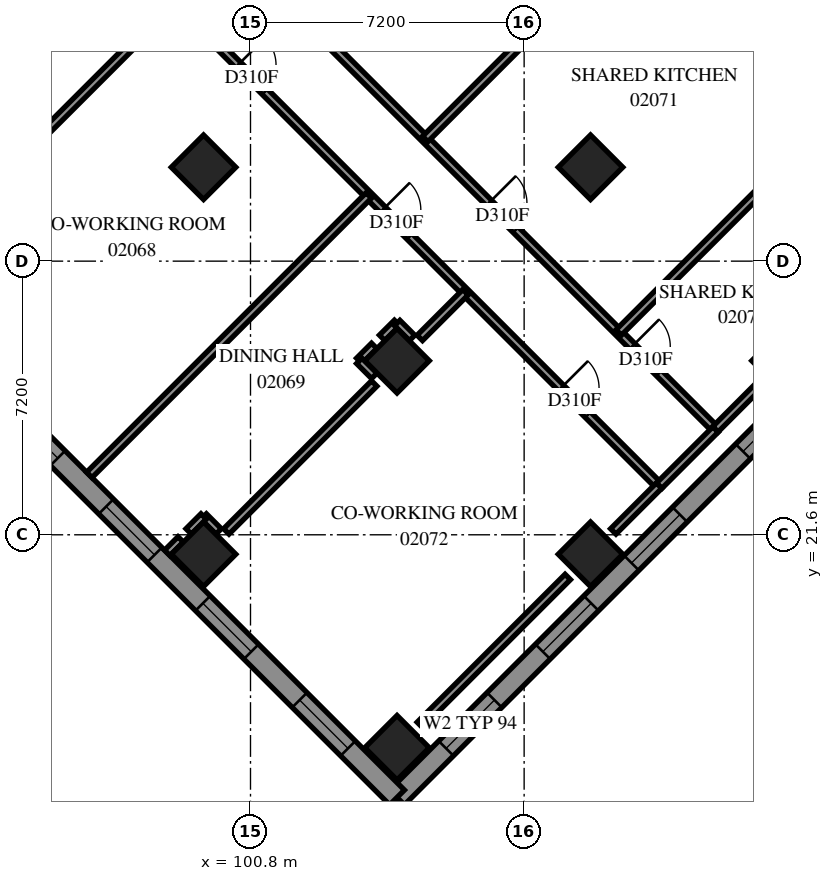
"""IFC4 building model, lengths in metres.
Left out: names, types, materials, properties, quantities, classifications, styles, units other than length and angle.
Written with IfcOpenShell. Run it as: python <this file> out.ifc"""

import sys

from ifc_helpers import new_model, si_unit, direction, frame, frame_2d, origin, origin_2d, place, context, subcontext, project, spatial, polyline, rectangle, outline, extrude, element, fill, save


model = new_model("IFC4")
c1 = context("Model", 3, precision=1e-05, world=origin(), true_north=direction((0.0, 1.0)))
c2 = subcontext(c1, "Body", "Model", "MODEL_VIEW")
j1 = project(units=[si_unit("LENGTHUNIT", "METRE"), si_unit("PLANEANGLEUNIT", "RADIAN")], contexts=[c1])
p1 = place(None, origin())
s1 = spatial("IfcSite", under=j1, at=p1, CompositionType="ELEMENT")
p2 = place(p1, origin())
s2 = spatial("IfcBuilding", under=s1, at=p2, CompositionType="ELEMENT")
p3 = place(p2, frame((0.0, 0.0, 10.2)))
s3 = spatial("IfcBuildingStorey", under=s2, at=p3, CompositionType="ELEMENT", Elevation=10.2)
for number, where, z_axis, x_axis in (
    (1, (99.565, 31.271, 0.0), (0.0, 0.0, 1.0), (0.707, -0.707, 0.0)),
    (2, (109.747, 31.271, 0.0), (0.0, 0.0, 1.0), (0.707, -0.707, 0.0)),
    (3, (104.656, 26.18, 0.0), (0.0, 0.0, 1.0), (0.707, -0.707, 0.0)),
    (4, (99.565, 21.088, 0.0), (0.0, 0.0, 1.0), (0.707, -0.707, 0.0)),
    (5, (114.838, 26.18, 0.0), (0.0, 0.0, 1.0), (0.707, -0.707, 0.0)),
    (6, (109.747, 21.088, 0.0), (0.0, 0.0, 1.0), (0.707, -0.707, 0.0)),
    (7, (104.656, 15.997, 0.0), (0.0, 0.0, 1.0), (0.707, -0.707, 0.0)),
):
    element("IfcColumn", number, at=place(p3, frame(where, z_axis=z_axis, x_axis=x_axis)), inside=s3, PredefinedType="COLUMN", context=c2, shape_type="SweptSolid", body=[
        extrude(rectangle(XDim=1.2, YDim=1.2, at=origin_2d()), origin(), (0.0, 0.0, 1.0), 3.8),
    ])
p4 = place(p3, frame((104.656, 14.689, 0.0), z_axis=(0.0, 0.0, 1.0), x_axis=(0.7071094621, 0.7071041002, 0.0)))
e8 = element("IfcWall", 8, at=p4, inside=s3, PredefinedType="SOLIDWALL", context=c2, shape_type="SweptSolid", body=[
    extrude(outline(polyline([(-0.275, -0.275), (18.925, -0.275), (18.375, 0.275), (0.275, 0.275), (-0.275, -0.275)])), origin(), (0.0, 0.0, 1.0), 3.8),
])
p5 = place(p4, frame((1.825, 0.0, 0.7)))
e9 = element("IfcOpeningElement", 9, at=p5, cuts=e8, PredefinedType="OPENING", context=c2, shape_type="SweptSolid", body=[
    extrude(rectangle(XDim=1.8, YDim=2.6, at=frame_2d((0.9, 1.3))), frame((0.0, 0.285, 0.0), z_axis=(0.0, -1.0, 0.0), x_axis=(1.0, 0.0, 0.0)), (0.0, 0.0, 1.0), 0.57),
])
p6 = place(p4, frame((5.425, 0.0, 0.7)))
e10 = element("IfcOpeningElement", 10, at=p6, cuts=e8, PredefinedType="OPENING", context=c2, shape_type="SweptSolid", body=[
    extrude(rectangle(XDim=1.8, YDim=2.6, at=frame_2d((0.9, 1.3))), frame((0.0, 0.285, 0.0), z_axis=(0.0, -1.0, 0.0), x_axis=(1.0, 0.0, 0.0)), (0.0, 0.0, 1.0), 0.57),
])
p7 = place(p4, frame((8.725, 0.0, 0.7)))
e11 = element("IfcOpeningElement", 11, at=p7, cuts=e8, PredefinedType="OPENING", context=c2, shape_type="SweptSolid", body=[
    extrude(rectangle(XDim=1.8, YDim=2.6, at=frame_2d((0.9, 1.3))), frame((0.0, 0.285, 0.0), z_axis=(0.0, -1.0, 0.0), x_axis=(1.0, 0.0, 0.0)), (0.0, 0.0, 1.0), 0.57),
])
p8 = place(p4, frame((12.875, 0.0, 0.7)))
e12 = element("IfcOpeningElement", 12, at=p8, cuts=e8, PredefinedType="OPENING", context=c2, shape_type="SweptSolid", body=[
    extrude(rectangle(XDim=1.8, YDim=2.6, at=frame_2d((0.9, 1.3))), frame((0.0, 0.285, 0.0), z_axis=(0.0, -1.0, 0.0), x_axis=(1.0, 0.0, 0.0)), (0.0, 0.0, 1.0), 0.57),
])
p9 = place(p4, frame((16.05, 0.0, 0.7)))
e13 = element("IfcOpeningElement", 13, at=p9, cuts=e8, PredefinedType="OPENING", context=c2, shape_type="SweptSolid", body=[
    extrude(rectangle(XDim=1.8, YDim=2.6, at=frame_2d((0.9, 1.3))), frame((0.0, 0.285, 0.0), z_axis=(0.0, -1.0, 0.0), x_axis=(1.0, 0.0, 0.0)), (0.0, 0.0, 1.0), 0.57),
])
p10 = place(p3, frame((77.07, 42.275, 0.0), z_axis=(0.0, 0.0, 1.0), x_axis=(0.7071067812, -0.7071067812, 0.0)))
e14 = element("IfcWall", 14, at=p10, inside=s3, PredefinedType="SOLIDWALL", context=c2, shape_type="SweptSolid", body=[
    extrude(outline(polyline([(0.114, -0.275), (39.288, -0.275), (38.737, 0.275), (-0.114, 0.275), (0.114, -0.275)])), origin(), (0.0, 0.0, 1.0), 3.8),
])
p11 = place(p10, frame((2.837, 0.0, 0.7)))
e15 = element("IfcOpeningElement", 15, at=p11, cuts=e14, PredefinedType="OPENING", context=c2, shape_type="SweptSolid", body=[
    extrude(rectangle(XDim=1.8, YDim=2.6, at=frame_2d((0.9, 1.3))), frame((0.0, 0.285, 0.0), z_axis=(0.0, -1.0, 0.0), x_axis=(1.0, 0.0, 0.0)), (0.0, 0.0, 1.0), 0.57),
])
p12 = place(p10, frame((6.588, 0.0, 0.7)))
e16 = element("IfcOpeningElement", 16, at=p12, cuts=e14, PredefinedType="OPENING", context=c2, shape_type="SweptSolid", body=[
    extrude(rectangle(XDim=1.8, YDim=2.6, at=frame_2d((0.9, 1.3))), frame((0.0, 0.285, 0.0), z_axis=(0.0, -1.0, 0.0), x_axis=(1.0, 0.0, 0.0)), (0.0, 0.0, 1.0), 0.57),
])
p13 = place(p10, frame((10.188, 0.0, 0.7)))
e17 = element("IfcOpeningElement", 17, at=p13, cuts=e14, PredefinedType="OPENING", context=c2, shape_type="SweptSolid", body=[
    extrude(rectangle(XDim=1.8, YDim=2.6, at=frame_2d((0.9, 1.3))), frame((0.0, 0.285, 0.0), z_axis=(0.0, -1.0, 0.0), x_axis=(1.0, 0.0, 0.0)), (0.0, 0.0, 1.0), 0.57),
])
p14 = place(p10, frame((13.787, 0.0, 0.7)))
e18 = element("IfcOpeningElement", 18, at=p14, cuts=e14, PredefinedType="OPENING", context=c2, shape_type="SweptSolid", body=[
    extrude(rectangle(XDim=1.8, YDim=2.6, at=frame_2d((0.9, 1.3))), frame((0.0, 0.285, 0.0), z_axis=(0.0, -1.0, 0.0), x_axis=(1.0, 0.0, 0.0)), (0.0, 0.0, 1.0), 0.57),
])
p15 = place(p10, frame((17.387, 0.0, 0.7)))
e19 = element("IfcOpeningElement", 19, at=p15, cuts=e14, PredefinedType="OPENING", context=c2, shape_type="SweptSolid", body=[
    extrude(rectangle(XDim=1.8, YDim=2.6, at=frame_2d((0.9, 1.3))), frame((0.0, 0.285, 0.0), z_axis=(0.0, -1.0, 0.0), x_axis=(1.0, 0.0, 0.0)), (0.0, 0.0, 1.0), 0.57),
])
p16 = place(p10, frame((20.988, 0.0, 0.7)))
e20 = element("IfcOpeningElement", 20, at=p16, cuts=e14, PredefinedType="OPENING", context=c2, shape_type="SweptSolid", body=[
    extrude(rectangle(XDim=1.8, YDim=2.6, at=frame_2d((0.9, 1.3))), frame((0.0, 0.285, 0.0), z_axis=(0.0, -1.0, 0.0), x_axis=(1.0, 0.0, 0.0)), (0.0, 0.0, 1.0), 0.57),
])
p17 = place(p10, frame((24.587, 0.0, 0.7)))
e21 = element("IfcOpeningElement", 21, at=p17, cuts=e14, PredefinedType="OPENING", context=c2, shape_type="SweptSolid", body=[
    extrude(rectangle(XDim=1.8, YDim=2.6, at=frame_2d((0.9, 1.3))), frame((0.0, 0.285, 0.0), z_axis=(0.0, -1.0, 0.0), x_axis=(1.0, 0.0, 0.0)), (0.0, 0.0, 1.0), 0.57),
])
p18 = place(p10, frame((28.188, 0.0, 0.7)))
e22 = element("IfcOpeningElement", 22, at=p18, cuts=e14, PredefinedType="OPENING", context=c2, shape_type="SweptSolid", body=[
    extrude(rectangle(XDim=1.8, YDim=2.6, at=frame_2d((0.9, 1.3))), frame((0.0, 0.285, 0.0), z_axis=(0.0, -1.0, 0.0), x_axis=(1.0, 0.0, 0.0)), (0.0, 0.0, 1.0), 0.57),
])
p19 = place(p10, frame((31.788, 0.0, 0.7)))
e23 = element("IfcOpeningElement", 23, at=p19, cuts=e14, PredefinedType="OPENING", context=c2, shape_type="SweptSolid", body=[
    extrude(rectangle(XDim=1.8, YDim=2.6, at=frame_2d((0.9, 1.3))), frame((0.0, 0.285, 0.0), z_axis=(0.0, -1.0, 0.0), x_axis=(1.0, 0.0, 0.0)), (0.0, 0.0, 1.0), 0.57),
])
p20 = place(p10, frame((35.388, 0.0, 0.7)))
e24 = element("IfcOpeningElement", 24, at=p20, cuts=e14, PredefinedType="OPENING", context=c2, shape_type="SweptSolid", body=[
    extrude(rectangle(XDim=1.8, YDim=2.6, at=frame_2d((0.9, 1.3))), frame((0.0, 0.285, 0.0), z_axis=(0.0, -1.0, 0.0), x_axis=(1.0, 0.0, 0.0)), (0.0, 0.0, 1.0), 0.57),
])
p21 = place(p3, frame((94.861, 42.544, 0.0), z_axis=(0.0, 0.0, 1.0), x_axis=(0.7071067812, -0.7071067812, 0.0)))
e25 = element("IfcWall", 25, at=p21, inside=s3, PredefinedType="PARTITIONING", context=c2, shape_type="SweptSolid", body=[
    extrude(rectangle(XDim=25.699, YDim=0.2, at=frame_2d((12.85, 0.0))), origin(), (0.0, 0.0, 1.0), 3.8),
])
p22 = place(p21, frame((10.072, 0.0, 0.0)))
e26 = element("IfcOpeningElement", 26, at=p22, cuts=e25, PredefinedType="OPENING", context=c2, shape_type="SweptSolid", body=[
    extrude(rectangle(XDim=1.0, YDim=2.1, at=frame_2d((0.5, 1.05))), frame((0.0, 0.11, 0.0), z_axis=(0.0, -1.0, 0.0), x_axis=(1.0, 0.0, 0.0)), (0.0, 0.0, 1.0), 0.22),
])
p23 = place(p21, frame((2.872, 0.0, 0.0)))
e27 = element("IfcOpeningElement", 27, at=p23, cuts=e25, PredefinedType="OPENING", context=c2, shape_type="SweptSolid", body=[
    extrude(rectangle(XDim=1.0, YDim=2.1, at=frame_2d((0.5, 1.05))), frame((0.0, 0.11, 0.0), z_axis=(0.0, -1.0, 0.0), x_axis=(1.0, 0.0, 0.0)), (0.0, 0.0, 1.0), 0.22),
])
p24 = place(p21, frame((17.272, 0.0, 0.0)))
e28 = element("IfcOpeningElement", 28, at=p24, cuts=e25, PredefinedType="OPENING", context=c2, shape_type="SweptSolid", body=[
    extrude(rectangle(XDim=1.0, YDim=2.1, at=frame_2d((0.5, 1.05))), frame((0.0, 0.11, 0.0), z_axis=(0.0, -1.0, 0.0), x_axis=(1.0, 0.0, 0.0)), (0.0, 0.0, 1.0), 0.22),
])
p25 = place(p21, frame((22.606, 0.0, 0.0)))
e29 = element("IfcOpeningElement", 29, at=p25, cuts=e25, PredefinedType="OPENING", context=c2, shape_type="SweptSolid", body=[
    extrude(rectangle(XDim=1.0, YDim=2.1, at=frame_2d((0.5, 1.05))), frame((0.0, 0.11, 0.0), z_axis=(0.0, -1.0, 0.0), x_axis=(1.0, 0.0, 0.0)), (0.0, 0.0, 1.0), 0.22),
])
p26 = place(p3, frame((93.375, 41.061, 0.0), z_axis=(0.0, 0.0, 1.0), x_axis=(0.7071067812, -0.7071067812, 0.0)))
e30 = element("IfcWall", 30, at=p26, inside=s3, PredefinedType="PARTITIONING", context=c2, shape_type="SweptSolid", body=[
    extrude(rectangle(XDim=25.699, YDim=0.2, at=frame_2d((12.85, 0.0))), origin(), (0.0, 0.0, 1.0), 3.8),
])
p27 = place(p26, frame((2.837, 0.0, 0.0)))
e31 = element("IfcOpeningElement", 31, at=p27, cuts=e30, PredefinedType="OPENING", context=c2, shape_type="SweptSolid", body=[
    extrude(rectangle(XDim=1.0, YDim=2.1, at=frame_2d((0.5, 1.05))), frame((0.0, 0.11, 0.0), z_axis=(0.0, -1.0, 0.0), x_axis=(1.0, 0.0, 0.0)), (0.0, 0.0, 1.0), 0.22),
])
p28 = place(p26, frame((10.037, 0.0, 0.0)))
e32 = element("IfcOpeningElement", 32, at=p28, cuts=e30, PredefinedType="OPENING", context=c2, shape_type="SweptSolid", body=[
    extrude(rectangle(XDim=1.0, YDim=2.1, at=frame_2d((0.5, 1.05))), frame((0.0, 0.11, 0.0), z_axis=(0.0, -1.0, 0.0), x_axis=(1.0, 0.0, 0.0)), (0.0, 0.0, 1.0), 0.22),
])
p29 = place(p26, frame((15.425, 0.0, 0.0)))
e33 = element("IfcOpeningElement", 33, at=p29, cuts=e30, PredefinedType="OPENING", context=c2, shape_type="SweptSolid", body=[
    extrude(rectangle(XDim=1.0, YDim=2.1, at=frame_2d((0.5, 1.05))), frame((0.0, 0.11, 0.0), z_axis=(0.0, -1.0, 0.0), x_axis=(1.0, 0.0, 0.0)), (0.0, 0.0, 1.0), 0.22),
])
p30 = place(p26, frame((22.057, 0.0, 0.0)))
e34 = element("IfcOpeningElement", 34, at=p30, cuts=e30, PredefinedType="OPENING", context=c2, shape_type="SweptSolid", body=[
    extrude(rectangle(XDim=1.0, YDim=2.1, at=frame_2d((0.5, 1.05))), frame((0.0, 0.11, 0.0), z_axis=(0.0, -1.0, 0.0), x_axis=(1.0, 0.0, 0.0)), (0.0, 0.0, 1.0), 0.22),
])
for number, where, z_axis, x_axis in (
    (35, (91.468, 28.266, 0.0), (0.0, 0.0, 1.0), (0.707, 0.707, 0.0)),
    (36, (96.559, 23.175, 0.0), (0.0, 0.0, 1.0), (0.707, 0.707, 0.0)),
):
    element("IfcWall", number, at=place(p3, frame(where, z_axis=z_axis, x_axis=x_axis)), inside=s3, PredefinedType="PARTITIONING", context=c2, shape_type="SweptSolid", body=[
        extrude(rectangle(XDim=10.4, YDim=0.2, at=frame_2d((5.2, 0.0))), origin(), (0.0, 0.0, 1.0), 3.8),
    ])
p31 = place(p3, frame((105.398, 32.014, 0.0), z_axis=(0.0, 0.0, 1.0), x_axis=(0.7071019733, 0.707111589, 0.0)))
e37 = element("IfcWall", 37, at=p31, inside=s3, PredefinedType="PARTITIONING", context=c2, shape_type="SweptSolid", body=[
    extrude(rectangle(XDim=10.4, YDim=0.2, at=frame_2d((5.2, 0.0))), origin(), (0.0, 0.0, 1.0), 3.8),
])
p32 = place(p3, frame((110.489, 26.923, 0.0), z_axis=(0.0, 0.0, 1.0), x_axis=(0.7071067812, 0.7071067812, 0.0)))
e38 = element("IfcWall", 38, at=p32, inside=s3, PredefinedType="PARTITIONING", context=c2, shape_type="SweptSolid", body=[
    extrude(rectangle(XDim=5.6, YDim=0.2, at=frame_2d((2.8, 0.0))), origin(), (0.0, 0.0, 1.0), 3.8),
])
p33 = place(p3, frame((105.255, 16.599, 0.0), z_axis=(0.0, 0.0, 1.0), x_axis=(0.7071067812, 0.7071067812, 0.0)))
e39 = element("IfcWall", 39, at=p33, inside=s3, PredefinedType="PARTITIONING", context=c2, shape_type="SweptSolid", body=[
    extrude(rectangle(XDim=5.504, YDim=0.2, at=frame_2d((2.752, 0.0))), origin(), (0.0, 0.0, 1.0), 3.2),
])
p34 = place(p3, frame((100.163, 21.689, 0.0), z_axis=(0.0, 0.0, 1.0), x_axis=(0.7071067812, 0.7071067812, 0.0)))
e40 = element("IfcWall", 40, at=p34, inside=s3, PredefinedType="PARTITIONING", context=c2, shape_type="SweptSolid", body=[
    extrude(rectangle(XDim=5.504, YDim=0.2, at=frame_2d((2.752, 0.0))), origin(), (0.0, 0.0, 1.0), 3.8),
])
p35 = place(p3, frame((111.552, 22.89, 0.0), z_axis=(0.0, 0.0, 1.0), x_axis=(0.7075827869, 0.7066304548, 0.0)))
e41 = element("IfcWall", 41, at=p35, inside=s3, PredefinedType="PARTITIONING", context=c2, shape_type="SweptSolid", body=[
    extrude(rectangle(XDim=2.1, YDim=0.2, at=frame_2d((1.05, 0.0))), origin(), (0.0, 0.0, 1.0), 3.2),
])
p36 = place(p3, frame((110.346, 21.689, 0.0), z_axis=(0.0, 0.0, 1.0), x_axis=(0.7071067812, 0.7071067812, 0.0)))
e42 = element("IfcWall", 42, at=p36, inside=s3, PredefinedType="PARTITIONING", context=c2, shape_type="SweptSolid", body=[
    extrude(rectangle(XDim=1.703, YDim=0.2, at=frame_2d((0.851, 0.0))), origin(), (0.0, 0.0, 1.0), 3.2),
])
p37 = place(p3, frame((113.034, 24.378, 0.0), z_axis=(0.0, 0.0, 1.0), x_axis=(0.7065187509, 0.7076943229, 0.0)))
e43 = element("IfcWall", 43, at=p37, inside=s3, PredefinedType="PARTITIONING", context=c2, shape_type="SweptSolid", body=[
    extrude(rectangle(XDim=1.701, YDim=0.2, at=frame_2d((0.851, 0.0))), origin(), (0.0, 0.0, 1.0), 3.2),
])
p38 = place(p3, frame((105.255, 26.781, 0.0), z_axis=(0.0, 0.0, 1.0), x_axis=(0.7071067812, 0.7071067812, 0.0)))
e44 = element("IfcWall", 44, at=p38, inside=s3, PredefinedType="PARTITIONING", context=c2, shape_type="SweptSolid", body=[
    extrude(rectangle(XDim=1.7, YDim=0.2, at=frame_2d((0.85, 0.0))), origin(), (0.0, 0.0, 1.0), 3.8),
])
for number, where, z_axis, x_axis in (
    (45, (99.568, 22.082, 0.0), (0.0, 0.0, 1.0), (0.707, -0.707, 0.0)),
    (46, (99.173, 21.689, 0.0), (0.0, 0.0, 1.0), (0.707, 0.707, 0.0)),
    (47, (103.661, 26.177, 0.0), (0.0, 0.0, 1.0), (0.707, 0.707, 0.0)),
    (48, (103.662, 26.177, 0.0), (0.0, 0.0, 1.0), (0.707, -0.707, 0.0)),
):
    element("IfcWall", number, at=place(p3, frame(where, z_axis=z_axis, x_axis=x_axis)), inside=s3, PredefinedType="PARTITIONING", context=c2, shape_type="SweptSolid", body=[
        extrude(rectangle(XDim=0.557, YDim=0.2, at=frame_2d((0.279, 0.0))), origin(), (0.0, 0.0, 1.0), 3.8),
    ])
p39 = place(p3, frame((104.263, 26.784, 0.0), z_axis=(0.0, 0.0, 1.0), x_axis=(0.7089037401, 0.705305244, 0.0)))
e49 = element("IfcWall", 49, at=p39, inside=s3, PredefinedType="PARTITIONING", context=c2, shape_type="SweptSolid", body=[
    extrude(rectangle(XDim=0.556, YDim=0.2, at=frame_2d((0.278, 0.0))), origin(), (0.0, 0.0, 1.0), 3.8),
])
p40 = place(p3, frame((104.66, 27.172, 0.0), z_axis=(0.0, 0.0, 1.0), x_axis=(0.7071067812, -0.7071067812, 0.0)))
e50 = element("IfcWall", 50, at=p40, inside=s3, PredefinedType="PARTITIONING", context=c2, shape_type="SweptSolid", body=[
    extrude(rectangle(XDim=0.554, YDim=0.2, at=frame_2d((0.277, 0.0))), origin(), (0.0, 0.0, 1.0), 3.8),
])
p41 = place(p3, frame((98.609, 21.125, 0.0), z_axis=(0.0, 0.0, 1.0), x_axis=(0.7072066057, 0.7070069426, 0.0)))
e51 = element("IfcWall", 51, at=p41, inside=s3, PredefinedType="PARTITIONING", context=c2, shape_type="SweptSolid", body=[
    extrude(rectangle(XDim=0.501, YDim=0.2, at=frame_2d((0.25, 0.0))), origin(), (0.0, 0.0, 1.0), 3.8),
])
p42 = place(p5, origin())
e52 = element("IfcWindow", 52, at=p42, inside=s3, PartitioningType="SINGLE_PANEL", PredefinedType="WINDOW", context=c2, shape_type="SweptSolid", body=[
    extrude(rectangle(XDim=1.8, YDim=2.6, at=frame_2d((0.9, 1.3))), frame((0.0, 0.155, 0.0), z_axis=(0.0, -1.0, 0.0), x_axis=(1.0, 0.0, 0.0)), (0.0, 0.0, 1.0), 0.06),
])
fill(e9, e52)
p43 = place(p6, origin())
e53 = element("IfcWindow", 53, at=p43, inside=s3, PartitioningType="SINGLE_PANEL", PredefinedType="WINDOW", context=c2, shape_type="SweptSolid", body=[
    extrude(rectangle(XDim=1.8, YDim=2.6, at=frame_2d((0.9, 1.3))), frame((0.0, 0.155, 0.0), z_axis=(0.0, -1.0, 0.0), x_axis=(1.0, 0.0, 0.0)), (0.0, 0.0, 1.0), 0.06),
])
fill(e10, e53)
p44 = place(p7, origin())
e54 = element("IfcWindow", 54, at=p44, inside=s3, PartitioningType="SINGLE_PANEL", PredefinedType="WINDOW", context=c2, shape_type="SweptSolid", body=[
    extrude(rectangle(XDim=1.8, YDim=2.6, at=frame_2d((0.9, 1.3))), frame((0.0, 0.155, 0.0), z_axis=(0.0, -1.0, 0.0), x_axis=(1.0, 0.0, 0.0)), (0.0, 0.0, 1.0), 0.06),
])
fill(e11, e54)
p45 = place(p8, origin())
e55 = element("IfcWindow", 55, at=p45, inside=s3, PartitioningType="SINGLE_PANEL", PredefinedType="WINDOW", context=c2, shape_type="SweptSolid", body=[
    extrude(rectangle(XDim=1.8, YDim=2.6, at=frame_2d((0.9, 1.3))), frame((0.0, 0.155, 0.0), z_axis=(0.0, -1.0, 0.0), x_axis=(1.0, 0.0, 0.0)), (0.0, 0.0, 1.0), 0.06),
])
fill(e12, e55)
p46 = place(p17, origin())
e56 = element("IfcWindow", 56, at=p46, inside=s3, PartitioningType="SINGLE_PANEL", PredefinedType="WINDOW", context=c2, shape_type="SweptSolid", body=[
    extrude(rectangle(XDim=1.8, YDim=2.6, at=frame_2d((0.9, 1.3))), frame((0.0, 0.155, 0.0), z_axis=(0.0, -1.0, 0.0), x_axis=(1.0, 0.0, 0.0)), (0.0, 0.0, 1.0), 0.06),
])
fill(e21, e56)
p47 = place(p18, origin())
e57 = element("IfcWindow", 57, at=p47, inside=s3, PartitioningType="SINGLE_PANEL", PredefinedType="WINDOW", context=c2, shape_type="SweptSolid", body=[
    extrude(rectangle(XDim=1.8, YDim=2.6, at=frame_2d((0.9, 1.3))), frame((0.0, 0.155, 0.0), z_axis=(0.0, -1.0, 0.0), x_axis=(1.0, 0.0, 0.0)), (0.0, 0.0, 1.0), 0.06),
])
fill(e22, e57)
p48 = place(p19, origin())
e58 = element("IfcWindow", 58, at=p48, inside=s3, PartitioningType="SINGLE_PANEL", PredefinedType="WINDOW", context=c2, shape_type="SweptSolid", body=[
    extrude(rectangle(XDim=1.8, YDim=2.6, at=frame_2d((0.9, 1.3))), frame((0.0, 0.155, 0.0), z_axis=(0.0, -1.0, 0.0), x_axis=(1.0, 0.0, 0.0)), (0.0, 0.0, 1.0), 0.06),
])
fill(e23, e58)
p49 = place(p20, origin())
e59 = element("IfcWindow", 59, at=p49, inside=s3, PartitioningType="SINGLE_PANEL", PredefinedType="WINDOW", context=c2, shape_type="SweptSolid", body=[
    extrude(rectangle(XDim=1.8, YDim=2.6, at=frame_2d((0.9, 1.3))), frame((0.0, 0.155, 0.0), z_axis=(0.0, -1.0, 0.0), x_axis=(1.0, 0.0, 0.0)), (0.0, 0.0, 1.0), 0.06),
])
fill(e24, e59)
p50 = place(p28, origin())
e60 = element("IfcDoor", 60, at=p50, inside=s3, OperationType="SINGLE_SWING_LEFT", PredefinedType="DOOR", context=c2, shape_type="SweptSolid", body=[
    extrude(rectangle(XDim=1.0, YDim=2.1, at=frame_2d((0.5, 1.05))), frame((0.0, 0.025, 0.0), z_axis=(0.0, -1.0, 0.0), x_axis=(1.0, 0.0, 0.0)), (0.0, 0.0, 1.0), 0.05),
])
fill(e32, e60)
p51 = place(p29, origin())
e61 = element("IfcDoor", 61, at=p51, inside=s3, OperationType="SINGLE_SWING_LEFT", PredefinedType="DOOR", context=c2, shape_type="SweptSolid", body=[
    extrude(rectangle(XDim=1.0, YDim=2.1, at=frame_2d((0.5, 1.05))), frame((0.0, 0.025, 0.0), z_axis=(0.0, -1.0, 0.0), x_axis=(1.0, 0.0, 0.0)), (0.0, 0.0, 1.0), 0.05),
])
fill(e33, e61)
p52 = place(p24, origin())
e62 = element("IfcDoor", 62, at=p52, inside=s3, OperationType="SINGLE_SWING_RIGHT", PredefinedType="DOOR", context=c2, shape_type="SweptSolid", body=[
    extrude(rectangle(XDim=1.0, YDim=2.1, at=frame_2d((0.5, 1.05))), frame((0.0, 0.025, 0.0), z_axis=(0.0, -1.0, 0.0), x_axis=(1.0, 0.0, 0.0)), (0.0, 0.0, 1.0), 0.05),
])
fill(e28, e62)
p53 = place(p30, origin())
e63 = element("IfcDoor", 63, at=p53, inside=s3, OperationType="SINGLE_SWING_RIGHT", PredefinedType="DOOR", context=c2, shape_type="SweptSolid", body=[
    extrude(rectangle(XDim=1.0, YDim=2.1, at=frame_2d((0.5, 1.05))), frame((0.0, 0.025, 0.0), z_axis=(0.0, -1.0, 0.0), x_axis=(1.0, 0.0, 0.0)), (0.0, 0.0, 1.0), 0.05),
])
fill(e34, e63)
p54 = place(p25, origin())
e64 = element("IfcDoor", 64, at=p54, inside=s3, OperationType="SINGLE_SWING_RIGHT", PredefinedType="DOOR", context=c2, shape_type="SweptSolid", body=[
    extrude(rectangle(XDim=1.0, YDim=2.1, at=frame_2d((0.5, 1.05))), frame((0.0, 0.025, 0.0), z_axis=(0.0, -1.0, 0.0), x_axis=(1.0, 0.0, 0.0)), (0.0, 0.0, 1.0), 0.05),
])
fill(e29, e64)
save(model, sys.argv[1])
